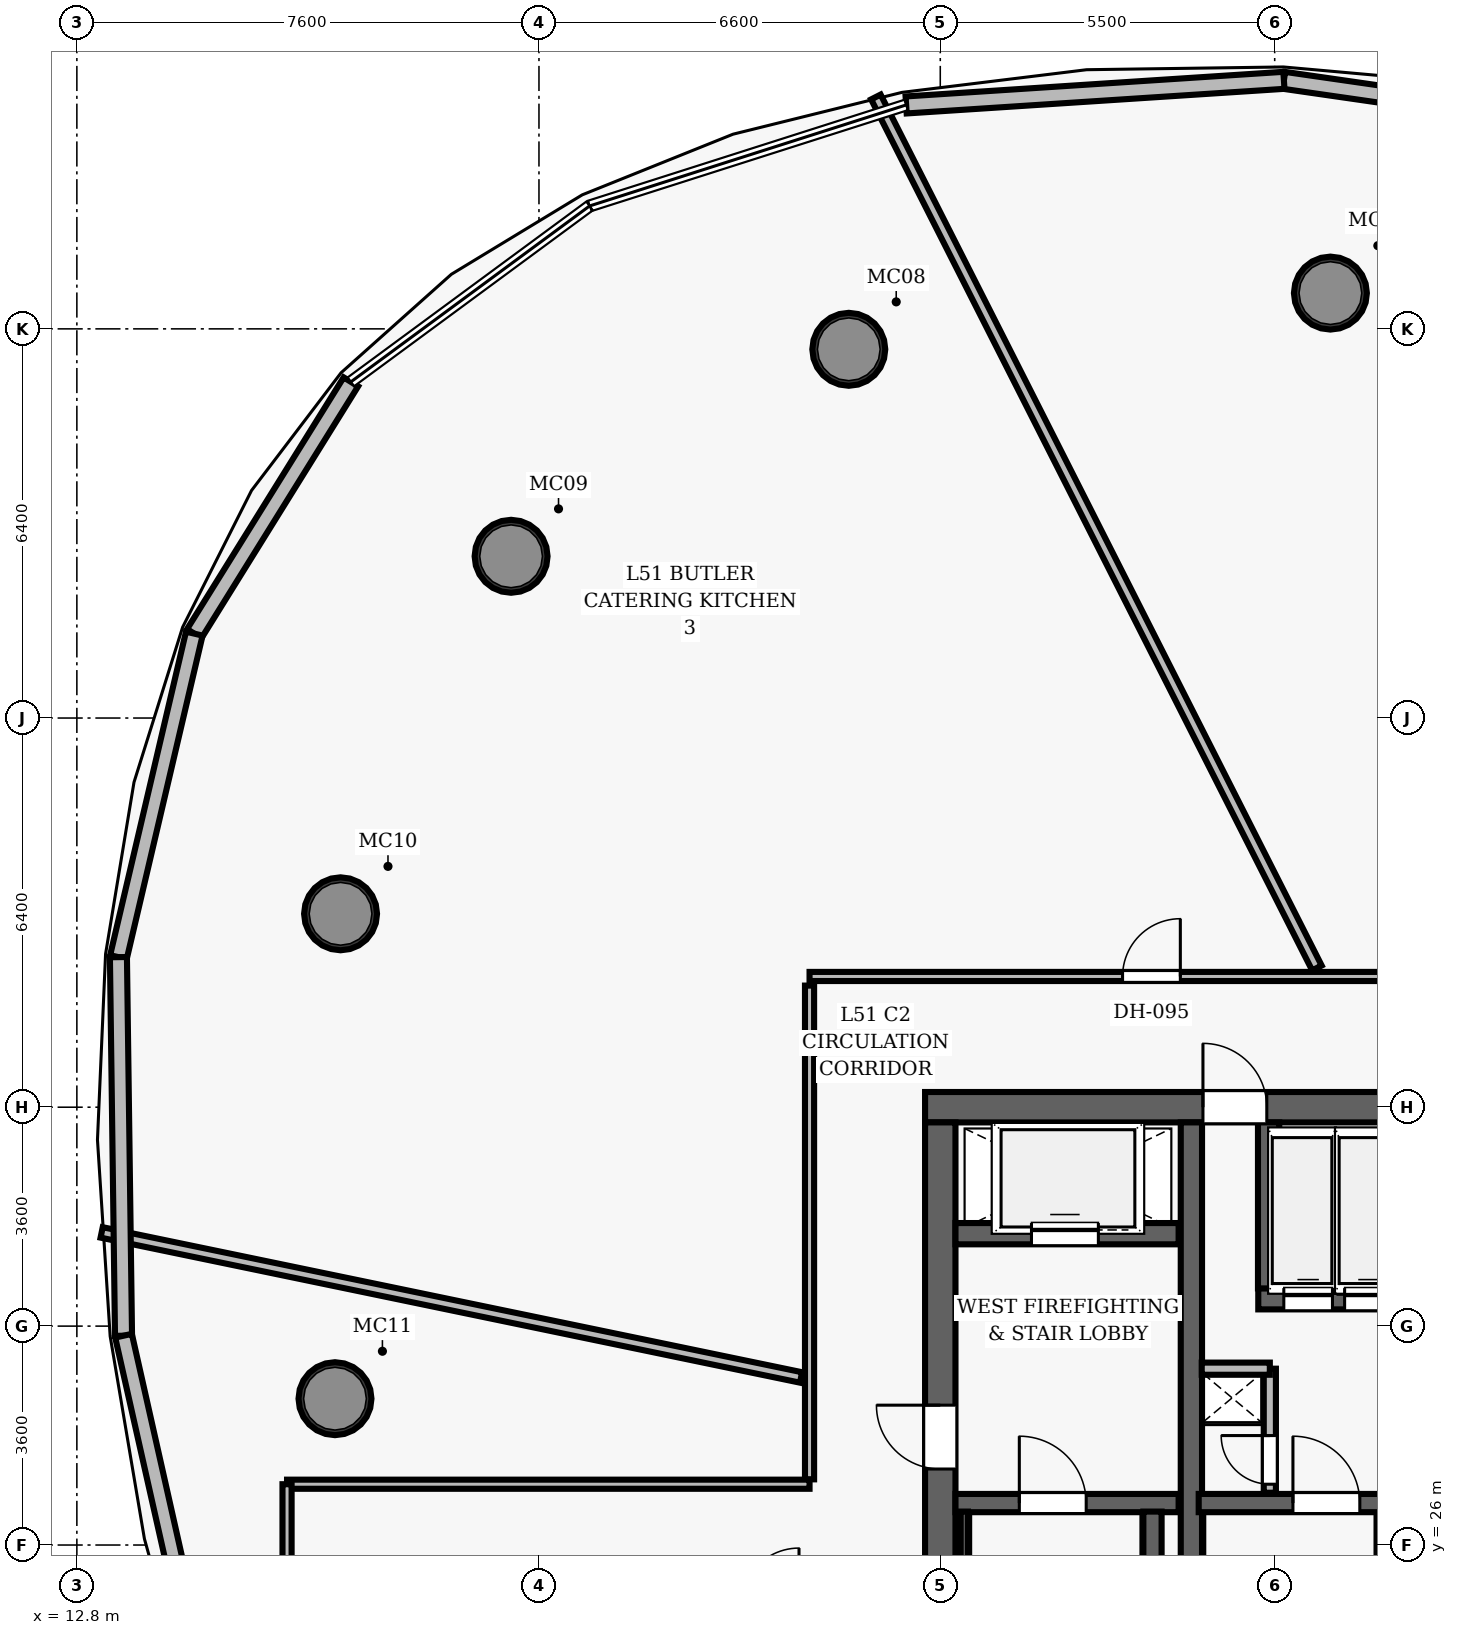
"""IFC4 building model, lengths in metres.
Left out: names, types, materials, properties, quantities, classifications, styles, units other than length and angle.
Written with IfcOpenShell. Run it as: python <this file> out.ifc"""

import sys

from ifc_helpers import new_model, si_unit, direction, frame, frame_2d, origin, origin_2d, place, context, subcontext, project, spatial, rectangle, hollow_circle, extrude, element, fill, save


model = new_model("IFC4")
c1 = context("Model", 3, precision=1e-05, world=origin(), true_north=direction((0.0, 1.0)))
c2 = subcontext(c1, "Body", "Model", "MODEL_VIEW")
j1 = project(units=[si_unit("LENGTHUNIT", "METRE"), si_unit("PLANEANGLEUNIT", "RADIAN")], contexts=[c1])
p1 = place(None, origin())
s1 = spatial("IfcSite", under=j1, at=p1, CompositionType="ELEMENT")
p2 = place(p1, origin())
s2 = spatial("IfcBuilding", under=s1, at=p2, CompositionType="ELEMENT")
p3 = place(p2, frame((0.0, 0.0, 202.0)))
s3 = spatial("IfcBuildingStorey", under=s2, at=p3, CompositionType="ELEMENT", Elevation=202.0)
p4 = place(p3, frame((26.75, 33.2, 0.0), z_axis=(0.0, 0.0, 1.0), x_axis=(1.0, 0.0, 0.0)))
e1 = element("IfcWall", 1, at=p4, inside=s3, PredefinedType="SHEAR", context=c2, shape_type="SweptSolid", body=[
    extrude(rectangle(XDim=22.5, YDim=0.5, at=frame_2d((11.25, 0.0))), origin(), (0.0, 0.0, 1.0), 3.85),
])
p5 = place(p4, frame((4.57, 0.0, 0.0)))
e2 = element("IfcOpeningElement", 2, at=p5, cuts=e1, PredefinedType="OPENING", context=c2, shape_type="SweptSolid", body=[
    extrude(rectangle(XDim=1.05, YDim=2.15, at=frame_2d((0.525, 1.075))), frame((0.0, 0.26, 0.0), z_axis=(0.0, -1.0, 0.0), x_axis=(1.0, 0.0, 0.0)), (0.0, 0.0, 1.0), 0.52),
])
p6 = place(p4, frame((14.47, 0.0, 0.0)))
e3 = element("IfcOpeningElement", 3, at=p6, cuts=e1, PredefinedType="OPENING", context=c2, shape_type="SweptSolid", body=[
    extrude(rectangle(XDim=1.05, YDim=2.15, at=frame_2d((0.525, 1.075))), frame((0.0, 0.26, 0.0), z_axis=(0.0, -1.0, 0.0), x_axis=(1.0, 0.0, 0.0)), (0.0, 0.0, 1.0), 0.52),
])
p7 = place(p3, frame((27.0, 19.05, 0.0), z_axis=(0.0, 0.0, 1.0), x_axis=(0.0, 1.0, 0.0)))
e4 = element("IfcWall", 4, at=p7, inside=s3, PredefinedType="SHEAR", context=c2, shape_type="SweptSolid", body=[
    extrude(rectangle(XDim=13.9, YDim=0.5, at=frame_2d((6.95, 0.0))), origin(), (0.0, 0.0, 1.0), 3.85),
])
p8 = place(p7, frame((8.2, 0.0, 0.0)))
e5 = element("IfcOpeningElement", 5, at=p8, cuts=e4, PredefinedType="OPENING", context=c2, shape_type="SweptSolid", body=[
    extrude(rectangle(XDim=1.05, YDim=2.15, at=frame_2d((0.525, 1.075))), frame((0.0, 0.26, 0.0), z_axis=(0.0, -1.0, 0.0), x_axis=(1.0, 0.0, 0.0)), (0.0, 0.0, 1.0), 0.52),
])
p9 = place(p3, frame((31.13, 19.05, 0.0), z_axis=(0.0, 0.0, 1.0), x_axis=(0.0, 1.0, 0.0)))
e6 = element("IfcWall", 6, at=p9, inside=s3, PredefinedType="SHEAR", context=c2, shape_type="SweptSolid", body=[
    extrude(rectangle(XDim=13.9, YDim=0.35, at=frame_2d((6.95, 0.0))), origin(), (0.0, 0.0, 1.0), 3.85),
])
for number, where, z_axis, x_axis in (
    (7, (33.416, 46.588, 0.0), (0.0, 0.0, 1.0), (1.0, 0.0, 0.0)),
    (8, (25.496, 45.664, 0.0), (0.0, 0.0, 1.0), (1.0, 0.0, 0.0)),
    (9, (19.942, 42.26, 0.0), (0.0, 0.0, 1.0), (1.0, 0.0, 0.0)),
    (10, (17.137, 36.381, 0.0), (0.0, 0.0, 1.0), (1.0, 0.0, 0.0)),
    (11, (17.045, 28.406, 0.0), (0.0, 0.0, 1.0), (1.0, 0.0, 0.0)),
):
    element("IfcColumn", number, at=place(p3, frame(where, z_axis=z_axis, x_axis=x_axis)), inside=s3, PredefinedType="COLUMN", context=c2, shape_type="SweptSolid", body=[
        extrude(hollow_circle(Radius=0.6, WallThickness=0.05, at=origin_2d()), origin(), (0.0, 0.0, 1.0), 3.85),
    ])
p10 = place(p3, frame((27.25, 26.69, 0.0), z_axis=(0.0, 0.0, 1.0), x_axis=(1.0, 0.0, 0.0)))
e12 = element("IfcWall", 12, at=p10, inside=s3, PredefinedType="SHEAR", context=c2, shape_type="SweptSolid", body=[
    extrude(rectangle(XDim=3.67, YDim=0.3, at=frame_2d((1.835, 0.0))), origin(), (0.0, 0.0, 1.0), 3.85),
])
p11 = place(p10, frame((1.05, 0.0, 0.0)))
e13 = element("IfcOpeningElement", 13, at=p11, cuts=e12, PredefinedType="OPENING", context=c2, shape_type="SweptSolid", body=[
    extrude(rectangle(XDim=1.1, YDim=2.15, at=frame_2d((0.55, 1.075))), frame((0.0, 0.16, 0.0), z_axis=(0.0, -1.0, 0.0), x_axis=(1.0, 0.0, 0.0)), (0.0, 0.0, 1.0), 0.32),
])
p12 = place(p3, frame((30.49, 19.05, 0.0), z_axis=(0.0, 0.0, 1.0), x_axis=(0.0, 1.0, 0.0)))
e14 = element("IfcWall", 14, at=p12, inside=s3, PredefinedType="SHEAR", context=c2, shape_type="SweptSolid", body=[
    extrude(rectangle(XDim=7.5, YDim=0.3, at=frame_2d((3.75, 0.0))), origin(), (0.0, 0.0, 1.0), 3.85),
])
p13 = place(p3, frame((27.395, 19.1, 0.0), z_axis=(0.0, 0.0, 1.0), x_axis=(0.0, 1.0, 0.0)))
e15 = element("IfcWall", 15, at=p13, inside=s3, PredefinedType="SHEAR", context=c2, shape_type="SweptSolid", body=[
    extrude(rectangle(XDim=7.45, YDim=0.12, at=frame_2d((3.725, 0.0))), origin(), (0.0, 0.0, 1.0), 3.85),
])
p14 = place(p3, frame((27.25, 31.12, 0.0), z_axis=(0.0, 0.0, 1.0), x_axis=(1.0, 0.0, 0.0)))
e16 = element("IfcWall", 16, at=p14, inside=s3, PredefinedType="SHEAR", context=c2, shape_type="SweptSolid", body=[
    extrude(rectangle(XDim=3.67, YDim=0.35, at=frame_2d((1.835, 0.0))), origin(), (0.0, 0.0, 1.0), 3.035),
])
p15 = place(p14, frame((1.25, 0.0, 0.0)))
e17 = element("IfcOpeningElement", 17, at=p15, cuts=e16, PredefinedType="OPENING", context=c2, shape_type="SweptSolid", body=[
    extrude(rectangle(XDim=1.1, YDim=2.15, at=frame_2d((0.55, 1.075))), frame((0.0, 0.185, 0.0), z_axis=(0.0, -1.0, 0.0), x_axis=(1.0, 0.0, 0.0)), (0.0, 0.0, 1.0), 0.37),
])
p16 = place(p3, frame((31.25, 26.69, 0.0), z_axis=(0.0, 0.0, 1.0), x_axis=(1.0, 0.0, 0.0)))
e18 = element("IfcWall", 18, at=p16, inside=s3, PredefinedType="SHEAR", context=c2, shape_type="SweptSolid", body=[
    extrude(rectangle(XDim=3.56, YDim=0.3, at=frame_2d((1.78, 0.0))), origin(), (0.0, 0.0, 1.0), 3.85),
])
p17 = place(p16, frame((1.55, 0.0, 0.0)))
e19 = element("IfcOpeningElement", 19, at=p17, cuts=e18, PredefinedType="OPENING", context=c2, shape_type="SweptSolid", body=[
    extrude(rectangle(XDim=1.1, YDim=2.15, at=frame_2d((0.55, 1.075))), frame((0.0, 0.16, 0.0), z_axis=(0.0, -1.0, 0.0), x_axis=(1.0, 0.0, 0.0)), (0.0, 0.0, 1.0), 0.32),
])
p18 = place(p3, frame((32.23, 30.05, 0.0), z_axis=(0.0, 0.0, 1.0), x_axis=(1.0, 0.0, 0.0)))
e20 = element("IfcWall", 20, at=p18, inside=s3, PredefinedType="SHEAR", context=c2, shape_type="SweptSolid", body=[
    extrude(rectangle(XDim=2.41, YDim=0.35, at=frame_2d((1.205, 0.0))), origin(), (0.0, 0.0, 1.0), 3.035),
])
p19 = place(p18, frame((0.42, 0.0, 0.0)))
e21 = element("IfcOpeningElement", 21, at=p19, cuts=e20, PredefinedType="OPENING", context=c2, shape_type="SweptSolid", body=[
    extrude(rectangle(XDim=0.8, YDim=2.15, at=frame_2d((0.4, 1.075))), frame((0.0, 0.185, 0.0), z_axis=(0.0, -1.0, 0.0), x_axis=(1.0, 0.0, 0.0)), (0.0, 0.0, 1.0), 0.37),
])
p20 = place(p18, frame((1.42, 0.0, 0.0)))
e22 = element("IfcOpeningElement", 22, at=p20, cuts=e20, PredefinedType="OPENING", context=c2, shape_type="SweptSolid", body=[
    extrude(rectangle(XDim=0.8, YDim=2.15, at=frame_2d((0.4, 1.075))), frame((0.0, 0.185, 0.0), z_axis=(0.0, -1.0, 0.0), x_axis=(1.0, 0.0, 0.0)), (0.0, 0.0, 1.0), 0.37),
])
p21 = place(p3, frame((32.4, 30.22, 0.0), z_axis=(0.0, 0.0, 1.0), x_axis=(0.0, 1.0, 0.0)))
e23 = element("IfcWall", 23, at=p21, inside=s3, PredefinedType="SHEAR", context=c2, shape_type="SweptSolid", body=[
    extrude(rectangle(XDim=2.73, YDim=0.35, at=frame_2d((1.365, 0.0))), origin(), (0.0, 0.0, 1.0), 3.035),
])
p22 = place(p3, frame((32.42, 26.86, 0.0), z_axis=(0.0, 0.0, 1.0), x_axis=(0.0, 1.0, 0.0)))
e24 = element("IfcWall", 24, at=p22, inside=s3, PredefinedType="PARTITIONING", context=c2, shape_type="SweptSolid", body=[
    extrude(rectangle(XDim=2.04, YDim=0.2, at=frame_2d((1.02, 0.0))), origin(), (0.0, 0.0, 1.0), 3.035),
])
p23 = place(p22, frame((0.14, 0.0, 0.0)))
e25 = element("IfcOpeningElement", 25, at=p23, cuts=e24, PredefinedType="OPENING", context=c2, shape_type="SweptSolid", body=[
    extrude(rectangle(XDim=0.8, YDim=2.05, at=frame_2d((0.4, 1.025))), frame((0.0, 0.11, 0.0), z_axis=(0.0, -1.0, 0.0), x_axis=(1.0, 0.0, 0.0)), (0.0, 0.0, 1.0), 0.22),
])
p24 = place(p3, frame((31.3, 28.9, 0.0), z_axis=(0.0, 0.0, 1.0), x_axis=(1.0, 0.0, 0.0)))
e26 = element("IfcWall", 26, at=p24, inside=s3, PredefinedType="PARTITIONING", context=c2, shape_type="SweptSolid", body=[
    extrude(rectangle(XDim=1.12, YDim=0.2, at=frame_2d((0.56, 0.0))), origin(), (0.0, 0.0, 1.0), 3.035),
])
p25 = place(p3, frame((24.85, 35.35, 0.0), z_axis=(0.0, 0.0, 1.0), x_axis=(1.0, 0.0, 0.0)))
e27 = element("IfcWall", 27, at=p25, inside=s3, PredefinedType="PARTITIONING", context=c2, shape_type="SweptSolid", body=[
    extrude(rectangle(XDim=26.0, YDim=0.15, at=frame_2d((13.0, 0.0))), origin(), (0.0, 0.0, 1.0), 3.035),
])
p26 = place(p25, frame((18.638, 0.0, 0.0)))
e28 = element("IfcOpeningElement", 28, at=p26, cuts=e27, PredefinedType="OPENING", context=c2, shape_type="SweptSolid", body=[
    extrude(rectangle(XDim=1.5, YDim=2.2, at=frame_2d((0.75, 1.1))), frame((0.0, 0.085, 0.0), z_axis=(0.0, -1.0, 0.0), x_axis=(1.0, 0.0, 0.0)), (0.0, 0.0, 1.0), 0.17),
])
p27 = place(p25, frame((9.737, 0.0, 0.0)))
e29 = element("IfcOpeningElement", 29, at=p27, cuts=e27, PredefinedType="OPENING", context=c2, shape_type="SweptSolid", body=[
    extrude(rectangle(XDim=1.5, YDim=2.2, at=frame_2d((0.75, 1.1))), frame((0.0, 0.085, 0.0), z_axis=(0.0, -1.0, 0.0), x_axis=(1.0, 0.0, 0.0)), (0.0, 0.0, 1.0), 0.17),
])
p28 = place(p25, frame((5.148, 0.0, 0.0)))
e30 = element("IfcOpeningElement", 30, at=p28, cuts=e27, PredefinedType="OPENING", context=c2, shape_type="SweptSolid", body=[
    extrude(rectangle(XDim=0.95, YDim=2.15, at=frame_2d((0.475, 1.075))), frame((0.0, 0.085, 0.0), z_axis=(0.0, -1.0, 0.0), x_axis=(1.0, 0.0, 0.0)), (0.0, 0.0, 1.0), 0.17),
])
p29 = place(p3, frame((24.85, 27.08, 0.0), z_axis=(0.0, 0.0, 1.0), x_axis=(0.0, 1.0, 0.0)))
e31 = element("IfcWall", 31, at=p29, inside=s3, PredefinedType="PARTITIONING", context=c2, shape_type="SweptSolid", body=[
    extrude(rectangle(XDim=8.12, YDim=0.15, at=frame_2d((4.06, 0.0))), origin(), (0.0, 0.0, 1.0), 3.035),
])
p30 = place(p3, frame((16.257, 27.0, 0.0), z_axis=(0.0, 0.0, 1.0), x_axis=(1.0, 0.0, 0.0)))
e32 = element("IfcWall", 32, at=p30, inside=s3, PredefinedType="PARTITIONING", context=c2, shape_type="SweptSolid", body=[
    extrude(rectangle(XDim=8.593, YDim=0.15, at=frame_2d((4.297, 0.0))), origin(), (0.0, 0.0, 1.0), 3.035),
])
p31 = place(p3, frame((16.257, 25.0, 0.0), z_axis=(0.0, 0.0, 1.0), x_axis=(0.0, 1.0, 0.0)))
e33 = element("IfcWall", 33, at=p31, inside=s3, PredefinedType="PARTITIONING", context=c2, shape_type="SweptSolid", body=[
    extrude(rectangle(XDim=2.0, YDim=0.15, at=frame_2d((1.0, 0.0))), origin(), (0.0, 0.0, 1.0), 3.035),
])
p32 = place(p3, frame((33.194, 35.49, 0.0), z_axis=(0.0, 0.0, 1.0), x_axis=(-0.451769726671, 0.892134582932, 0.0)))
e34 = element("IfcWall", 34, at=p32, inside=s3, PredefinedType="PARTITIONING", context=c2, shape_type="SweptSolid", body=[
    extrude(rectangle(XDim=16.055, YDim=0.175, at=frame_2d((8.027, 0.0))), origin(), (0.0, 0.0, 1.0), 3.035),
])
p33 = place(p3, frame((24.71, 28.756, 0.0), z_axis=(0.0, 0.0, 1.0), x_axis=(-0.979172598115, 0.203029611389, 0.0)))
e35 = element("IfcWall", 35, at=p33, inside=s3, PredefinedType="PARTITIONING", context=c2, shape_type="SweptSolid", body=[
    extrude(rectangle(XDim=11.747, YDim=0.175, at=frame_2d((5.874, 0.0))), origin(), (0.0, 0.0, 1.0), 3.035),
])
p34 = place(p3, frame((32.652, 50.087, 0.0), z_axis=(0.0, 0.0, 1.0), x_axis=(0.989784738796, -0.142569880575, 0.0)))
e36 = element("IfcWall", 36, at=p34, inside=s3, PredefinedType="SOLIDWALL", context=c2, shape_type="SweptSolid", body=[
    extrude(rectangle(XDim=6.785, YDim=0.28, at=frame_2d((3.392, 0.0))), origin(), (0.0, 0.0, 1.0), 3.62),
])
p35 = place(p3, frame((26.438, 49.682, 0.0), z_axis=(0.0, 0.0, 1.0), x_axis=(0.997881932346, 0.065051126793, 0.0)))
e37 = element("IfcWall", 37, at=p35, inside=s3, PredefinedType="SOLIDWALL", context=c2, shape_type="SweptSolid", body=[
    extrude(rectangle(XDim=6.226, YDim=0.28, at=frame_2d((3.113, 0.0))), origin(), (0.0, 0.0, 1.0), 3.62),
])
p36 = place(p3, frame((14.731, 40.988, 0.0), z_axis=(0.0, 0.0, 1.0), x_axis=(0.528197615515, 0.849121474799, 0.0)))
e38 = element("IfcWall", 38, at=p36, inside=s3, PredefinedType="SOLIDWALL", context=c2, shape_type="SweptSolid", body=[
    extrude(rectangle(XDim=4.876, YDim=0.28, at=frame_2d((2.438, 0.0))), origin(), (0.0, 0.0, 1.0), 3.62),
])
p37 = place(p3, frame((13.484, 35.668, 0.0), z_axis=(0.0, 0.0, 1.0), x_axis=(0.228297196915, 0.973591490247, 0.0)))
e39 = element("IfcWall", 39, at=p37, inside=s3, PredefinedType="SOLIDWALL", context=c2, shape_type="SweptSolid", body=[
    extrude(rectangle(XDim=5.465, YDim=0.28, at=frame_2d((2.732, 0.0))), origin(), (0.0, 0.0, 1.0), 3.62),
])
p38 = place(p3, frame((13.567, 29.442, 0.0), z_axis=(0.0, 0.0, 1.0), x_axis=(-0.013449236396, 0.99990955493, 0.0)))
e40 = element("IfcWall", 40, at=p38, inside=s3, PredefinedType="SOLIDWALL", context=c2, shape_type="SweptSolid", body=[
    extrude(rectangle(XDim=6.226, YDim=0.28, at=frame_2d((3.113, 0.0))), origin(), (0.0, 0.0, 1.0), 3.62),
])
p39 = place(p3, frame((15.059, 22.823, 0.0), z_axis=(0.0, 0.0, 1.0), x_axis=(-0.219802471022, 0.975544398648, 0.0)))
e41 = element("IfcWall", 41, at=p39, inside=s3, PredefinedType="SOLIDWALL", context=c2, shape_type="SweptSolid", body=[
    extrude(rectangle(XDim=6.784, YDim=0.28, at=frame_2d((3.392, 0.0))), origin(), (0.0, 0.0, 1.0), 3.62),
])
p40 = place(p11, origin())
e42 = element("IfcDoor", 42, at=p40, inside=s3, OperationType="SINGLE_SWING_LEFT", PredefinedType="DOOR", context=c2, shape_type="SweptSolid", body=[
    extrude(rectangle(XDim=1.1, YDim=2.15, at=frame_2d((0.55, 1.075))), frame((0.0, 0.025, 0.0), z_axis=(0.0, -1.0, 0.0), x_axis=(1.0, 0.0, 0.0)), (0.0, 0.0, 1.0), 0.05),
])
fill(e13, e42)
p41 = place(p8, origin())
e43 = element("IfcDoor", 43, at=p41, inside=s3, OperationType="SINGLE_SWING_RIGHT", PredefinedType="DOOR", context=c2, shape_type="SweptSolid", body=[
    extrude(rectangle(XDim=1.05, YDim=2.15, at=frame_2d((0.525, 1.075))), frame((0.0, 0.025, 0.0), z_axis=(0.0, -1.0, 0.0), x_axis=(1.0, 0.0, 0.0)), (0.0, 0.0, 1.0), 0.05),
])
fill(e5, e43)
p42 = place(p17, origin())
e44 = element("IfcDoor", 44, at=p42, inside=s3, OperationType="SINGLE_SWING_LEFT", PredefinedType="DOOR", context=c2, shape_type="SweptSolid", body=[
    extrude(rectangle(XDim=1.1, YDim=2.15, at=frame_2d((0.55, 1.075))), frame((0.0, 0.025, 0.0), z_axis=(0.0, -1.0, 0.0), x_axis=(1.0, 0.0, 0.0)), (0.0, 0.0, 1.0), 0.05),
])
fill(e19, e44)
p43 = place(p23, origin())
e45 = element("IfcDoor", 45, at=p43, inside=s3, OperationType="SINGLE_SWING_RIGHT", PredefinedType="DOOR", context=c2, shape_type="SweptSolid", body=[
    extrude(rectangle(XDim=0.8, YDim=2.05, at=frame_2d((0.4, 1.025))), frame((0.0, 0.025, 0.0), z_axis=(0.0, -1.0, 0.0), x_axis=(1.0, 0.0, 0.0)), (0.0, 0.0, 1.0), 0.05),
])
fill(e25, e45)
p44 = place(p5, origin())
e46 = element("IfcDoor", 46, at=p44, inside=s3, OperationType="SINGLE_SWING_LEFT", PredefinedType="DOOR", context=c2, shape_type="SweptSolid", body=[
    extrude(rectangle(XDim=1.05, YDim=2.15, at=frame_2d((0.525, 1.075))), frame((0.0, 0.025, 0.0), z_axis=(0.0, -1.0, 0.0), x_axis=(1.0, 0.0, 0.0)), (0.0, 0.0, 1.0), 0.05),
])
fill(e2, e46)
p45 = place(p28, origin())
e47 = element("IfcDoor", 47, at=p45, inside=s3, OperationType="SINGLE_SWING_RIGHT", PredefinedType="DOOR", context=c2, shape_type="SweptSolid", body=[
    extrude(rectangle(XDim=0.95, YDim=2.15, at=frame_2d((0.475, 1.075))), frame((0.0, 0.025, 0.0), z_axis=(0.0, -1.0, 0.0), x_axis=(1.0, 0.0, 0.0)), (0.0, 0.0, 1.0), 0.05),
])
fill(e30, e47)
p46 = place(p15, origin())
e48 = element("IfcDoor", 48, at=p46, inside=s3, OperationType="SLIDING_TO_LEFT", PredefinedType="DOOR", context=c2, shape_type="SweptSolid", body=[
    extrude(rectangle(XDim=1.1, YDim=2.15, at=frame_2d((0.55, 1.075))), frame((0.0, 0.025, 0.0), z_axis=(0.0, -1.0, 0.0), x_axis=(1.0, 0.0, 0.0)), (0.0, 0.0, 1.0), 0.05),
])
fill(e17, e48)
p47 = place(p19, origin())
e49 = element("IfcDoor", 49, at=p47, inside=s3, OperationType="SLIDING_TO_LEFT", PredefinedType="DOOR", context=c2, shape_type="SweptSolid", body=[
    extrude(rectangle(XDim=0.8, YDim=2.15, at=frame_2d((0.4, 1.075))), frame((0.0, 0.025, 0.0), z_axis=(0.0, -1.0, 0.0), x_axis=(1.0, 0.0, 0.0)), (0.0, 0.0, 1.0), 0.05),
])
fill(e21, e49)
p48 = place(p20, origin())
e50 = element("IfcDoor", 50, at=p48, inside=s3, OperationType="SLIDING_TO_LEFT", PredefinedType="DOOR", context=c2, shape_type="SweptSolid", body=[
    extrude(rectangle(XDim=0.8, YDim=2.15, at=frame_2d((0.4, 1.075))), frame((0.0, 0.025, 0.0), z_axis=(0.0, -1.0, 0.0), x_axis=(1.0, 0.0, 0.0)), (0.0, 0.0, 1.0), 0.05),
])
fill(e22, e50)
save(model, sys.argv[1])
